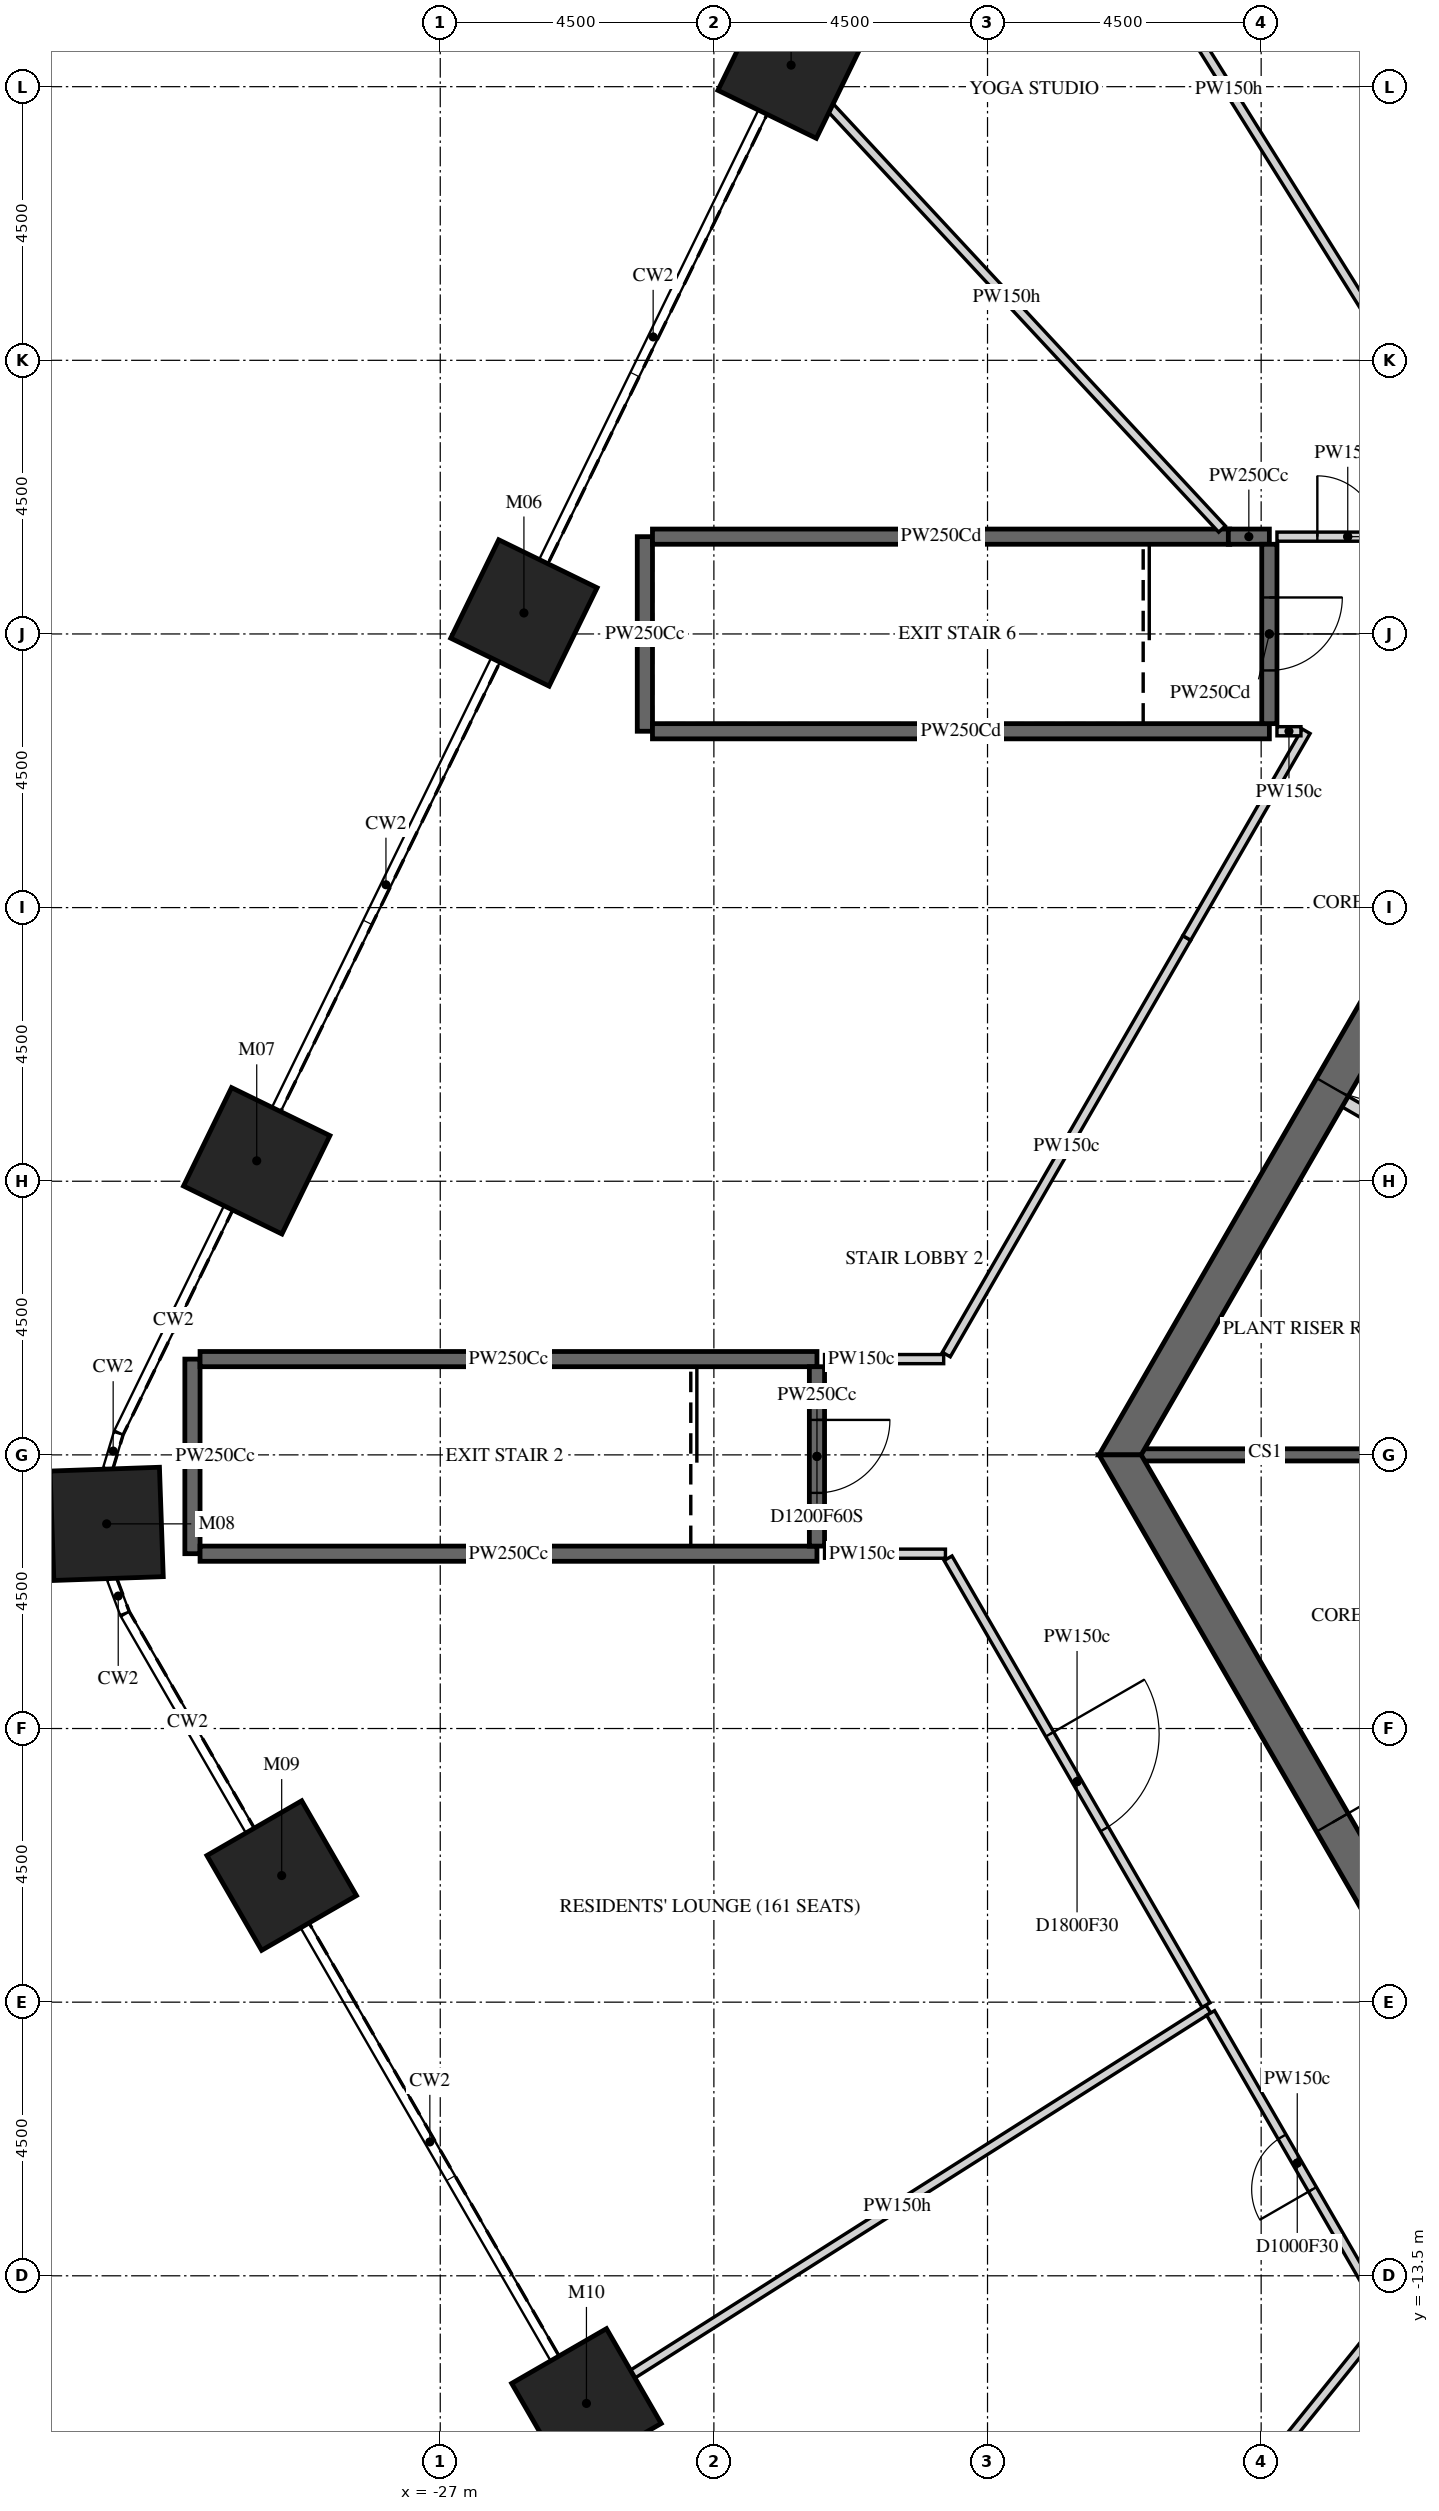
"""IFC4 building model, lengths in metres.
Left out: names, types, materials, properties, quantities, classifications, styles, units other than length and angle.
Written with IfcOpenShell. Run it as: python <this file> out.ifc"""

import sys

from ifc_helpers import new_model, si_unit, direction, frame, frame_2d, origin, origin_2d, place, context, subcontext, project, spatial, polyline, rectangle, outline, extrude, element, fill, save


model = new_model("IFC4")
c1 = context("Model", 3, precision=1e-05, world=origin(), true_north=direction((0.0, 1.0)))
c2 = subcontext(c1, "Body", "Model", "MODEL_VIEW")
j1 = project(units=[si_unit("LENGTHUNIT", "METRE"), si_unit("PLANEANGLEUNIT", "RADIAN")], contexts=[c1])
p1 = place(None, origin())
s1 = spatial("IfcSite", under=j1, at=p1, CompositionType="ELEMENT")
p2 = place(p1, origin())
s2 = spatial("IfcBuilding", under=s1, at=p2, CompositionType="ELEMENT")
p3 = place(p2, frame((0.0, 0.0, 26.0)))
s3 = spatial("IfcBuildingStorey", under=s2, at=p3, CompositionType="ELEMENT", Elevation=26.0)
for number, where, z_axis, x_axis in (
    (1, (-21.23, 22.854, -0.25), (0.0, 0.0, 1.0), (0.438, 0.899, 0.0)),
    (2, (-25.624, 13.845, -0.25), (0.0, 0.0, 1.0), (0.438, 0.899, 0.0)),
    (3, (-30.018, 4.836, -0.25), (0.0, 0.0, 1.0), (0.438, 0.899, 0.0)),
    (4, (-32.486, -1.135, -0.25), (0.0, 0.0, 1.0), (-0.035, 0.999, 0.0)),
    (5, (-29.608, -6.918, -0.25), (0.0, 0.0, 1.0), (-0.5, 0.866, 0.0)),
    (6, (-24.596, -15.599, -0.25), (0.0, 0.0, 1.0), (-0.5, 0.866, 0.0)),
):
    element("IfcColumn", number, at=place(p3, frame(where, z_axis=z_axis, x_axis=x_axis)), inside=s3, PredefinedType="COLUMN", context=c2, shape_type="SweptSolid", body=[
        extrude(rectangle(XDim=1.8, YDim=1.8, at=origin_2d()), origin(), (0.0, 0.0, 1.0), 5.45),
    ])
p4 = place(p3, frame((-7.91, 13.7, -0.25), z_axis=(0.0, 0.0, 1.0), x_axis=(-0.499999880136, -0.866025472988, 0.0)))
e7 = element("IfcWall", 7, at=p4, inside=s3, PredefinedType="SHEAR", context=c2, shape_type="SweptSolid", body=[
    extrude(outline(polyline([(-0.173, -0.3), (15.993, -0.3), (15.646, 0.3), (0.173, 0.3), (-0.173, -0.3)])), origin(), (0.0, 0.0, 1.0), 5.45),
])
p5 = place(p4, frame((7.039, 0.0, 0.25)))
e8 = element("IfcOpeningElement", 8, at=p5, cuts=e7, PredefinedType="OPENING", context=c2, shape_type="SweptSolid", body=[
    extrude(rectangle(XDim=1.8, YDim=2.4, at=frame_2d((0.9, 1.2))), frame((0.0, 0.31, 0.0), z_axis=(0.0, -1.0, 0.0), x_axis=(1.0, 0.0, 0.0)), (0.0, 0.0, 1.0), 0.62),
])
p6 = place(p3, frame((-15.819, 0.0, -0.25), z_axis=(0.0, 0.0, 1.0), x_axis=(0.499999880136, -0.866025472988, 0.0)))
e9 = element("IfcWall", 9, at=p6, inside=s3, PredefinedType="SHEAR", context=c2, shape_type="SweptSolid", body=[
    extrude(outline(polyline([(-0.173, -0.3), (15.993, -0.3), (15.646, 0.3), (0.173, 0.3), (-0.173, -0.3)])), origin(), (0.0, 0.0, 1.0), 5.45),
])
p7 = place(p6, frame((6.981, 0.0, 0.25)))
e10 = element("IfcOpeningElement", 10, at=p7, cuts=e9, PredefinedType="OPENING", context=c2, shape_type="SweptSolid", body=[
    extrude(rectangle(XDim=1.8, YDim=2.4, at=frame_2d((0.9, 1.2))), frame((0.0, 0.31, 0.0), z_axis=(0.0, -1.0, 0.0), x_axis=(1.0, 0.0, 0.0)), (0.0, 0.0, 1.0), 0.62),
])
p8 = place(p3, frame((-11.547, 0.0, -0.25), z_axis=(0.0, 0.0, 1.0), x_axis=(-1.0, 0.0, 0.0)))
e11 = element("IfcWall", 11, at=p8, inside=s3, PredefinedType="SHEAR", context=c2, shape_type="SweptSolid", body=[
    extrude(rectangle(XDim=3.926, YDim=0.2, at=frame_2d((1.963, 0.0))), origin(), (0.0, 0.0, 1.0), 5.45),
])
p9 = place(p3, frame((-9.175, 4.109, 0.0), z_axis=(0.0, 0.0, 1.0), x_axis=(-0.865989465428, 0.500062241894, 0.0)))
e12 = element("IfcWall", 12, at=p9, inside=s3, PredefinedType="PARTITIONING", context=c2, shape_type="SweptSolid", body=[
    extrude(rectangle(XDim=3.4, YDim=0.2, at=frame_2d((1.7, 0.0))), origin(), (0.0, 0.0, 1.0), 5.25),
])
p10 = place(p9, frame((1.351, 0.0, 0.0)))
e13 = element("IfcOpeningElement", 13, at=p10, cuts=e12, PredefinedType="OPENING", context=c2, shape_type="SweptSolid", body=[
    extrude(rectangle(XDim=0.9, YDim=2.1, at=frame_2d((0.45, 1.05))), frame((0.0, 0.11, 0.0), z_axis=(0.0, -1.0, 0.0), x_axis=(1.0, 0.0, 0.0)), (0.0, 0.0, 1.0), 0.22),
])
p11 = place(p3, frame((-31.075, -1.625, 0.0), z_axis=(0.0, 0.0, 1.0), x_axis=(0.0, 1.0, 0.0)))
e14 = element("IfcWall", 14, at=p11, inside=s3, PredefinedType="PARTITIONING", context=c2, shape_type="SweptSolid", body=[
    extrude(rectangle(XDim=3.2, YDim=0.25, at=frame_2d((1.6, 0.0))), origin(), (0.0, 0.0, 1.0), 5.2),
])
p12 = place(p3, frame((-30.95, 1.575, 0.0), z_axis=(0.0, 0.0, 1.0), x_axis=(1.0, 0.0, 0.0)))
e15 = element("IfcWall", 15, at=p12, inside=s3, PredefinedType="PARTITIONING", context=c2, shape_type="SweptSolid", body=[
    extrude(rectangle(XDim=10.145, YDim=0.25, at=frame_2d((5.073, 0.0))), origin(), (0.0, 0.0, 1.0), 5.2),
])
p13 = place(p3, frame((-24.596, -15.599, 0.0), z_axis=(0.0, 0.0, 1.0), x_axis=(0.844484782983, 0.535579547136, 0.0)))
e16 = element("IfcWall", 16, at=p13, inside=s3, PredefinedType="PARTITIONING", context=c2, shape_type="SweptSolid", body=[
    extrude(rectangle(XDim=12.11, YDim=0.15, at=frame_2d((6.055, 0.0))), origin(), (0.0, 0.0, 1.0), 4.273),
])
p14 = place(p3, frame((-23.635, 11.9, 0.0), z_axis=(0.0, 0.0, 1.0), x_axis=(0.0, 1.0, 0.0)))
e17 = element("IfcWall", 17, at=p14, inside=s3, PredefinedType="PARTITIONING", context=c2, shape_type="SweptSolid", body=[
    extrude(rectangle(XDim=3.2, YDim=0.25, at=frame_2d((1.6, 0.0))), origin(), (0.0, 0.0, 1.0), 5.2),
])
p15 = place(p3, frame((-23.51, 15.1, 0.0), z_axis=(0.0, 0.0, 1.0), x_axis=(1.0, 0.0, 0.0)))
e18 = element("IfcWall", 18, at=p15, inside=s3, PredefinedType="PARTITIONING", context=c2, shape_type="SweptSolid", body=[
    extrude(rectangle(XDim=9.493, YDim=0.25, at=frame_2d((4.747, 0.0))), origin(), (0.0, 0.0, 1.0), 4.273),
])
p16 = place(p3, frame((-21.23, 22.854, 0.0), z_axis=(0.0, 0.0, 1.0), x_axis=(0.680602169668, -0.732653183057, 0.0)))
e19 = element("IfcWall", 19, at=p16, inside=s3, PredefinedType="PARTITIONING", context=c2, shape_type="SweptSolid", body=[
    extrude(rectangle(XDim=10.413, YDim=0.15, at=frame_2d((5.206, 0.0))), origin(), (0.0, 0.0, 1.0), 4.273),
])
p17 = place(p3, frame((-20.805, -1.625, 0.0), z_axis=(0.0, 0.0, 1.0), x_axis=(-1.0, 0.0, 0.0)))
e20 = element("IfcWall", 20, at=p17, inside=s3, PredefinedType="PARTITIONING", context=c2, shape_type="SweptSolid", body=[
    extrude(rectangle(XDim=10.145, YDim=0.25, at=frame_2d((5.073, 0.0))), origin(), (0.0, 0.0, 1.0), 5.2),
])
p18 = place(p3, frame((-20.805, 1.45, 0.0), z_axis=(0.0, 0.0, 1.0), x_axis=(0.0, -1.0, 0.0)))
e21 = element("IfcWall", 21, at=p18, inside=s3, PredefinedType="PARTITIONING", context=c2, shape_type="SweptSolid", body=[
    extrude(rectangle(XDim=2.95, YDim=0.25, at=frame_2d((1.475, 0.0))), origin(), (0.0, 0.0, 1.0), 5.2),
])
p19 = place(p18, frame((0.875, 0.0, 0.0)))
e22 = element("IfcOpeningElement", 22, at=p19, cuts=e21, PredefinedType="OPENING", context=c2, shape_type="SweptSolid", body=[
    extrude(rectangle(XDim=1.2, YDim=2.1, at=frame_2d((0.6, 1.05))), frame((0.0, 0.135, 0.0), z_axis=(0.0, -1.0, 0.0), x_axis=(1.0, 0.0, 0.0)), (0.0, 0.0, 1.0), 0.27),
])
p20 = place(p3, frame((-20.68, 1.575, 0.0), z_axis=(0.0, 0.0, 1.0), x_axis=(1.0, 0.0, 0.0)))
e23 = element("IfcWall", 23, at=p20, inside=s3, PredefinedType="PARTITIONING", context=c2, shape_type="SweptSolid", body=[
    extrude(rectangle(XDim=1.959, YDim=0.15, at=frame_2d((0.979, 0.0))), origin(), (0.0, 0.0, 1.0), 5.2),
])
p21 = place(p3, frame((-19.584, -24.28, 0.0), z_axis=(0.0, 0.0, 1.0), x_axis=(0.627807267634, 0.77836882948, 0.0)))
e24 = element("IfcWall", 24, at=p21, inside=s3, PredefinedType="PARTITIONING", context=c2, shape_type="SweptSolid", body=[
    extrude(rectangle(XDim=12.971, YDim=0.15, at=frame_2d((6.485, 0.0))), origin(), (0.0, 0.0, 1.0), 5.2),
])
p22 = place(p3, frame((-18.692, -1.625, 0.0), z_axis=(0.0, 0.0, 1.0), x_axis=(-1.0, 0.0, 0.0)))
e25 = element("IfcWall", 25, at=p22, inside=s3, PredefinedType="PARTITIONING", context=c2, shape_type="SweptSolid", body=[
    extrude(rectangle(XDim=1.988, YDim=0.15, at=frame_2d((0.994, 0.0))), origin(), (0.0, 0.0, 1.0), 5.2),
])
p23 = place(p3, frame((-18.649, -1.7, 0.0), z_axis=(0.0, 0.0, 1.0), x_axis=(0.499976511579, -0.866038964406, 0.0)))
e26 = element("IfcWall", 26, at=p23, inside=s3, PredefinedType="PARTITIONING", context=c2, shape_type="SweptSolid", body=[
    extrude(rectangle(XDim=8.485, YDim=0.15, at=frame_2d((4.242, 0.0))), origin(), (0.0, 0.0, 1.0), 5.2),
])
p24 = place(p23, frame((3.342, 0.0, 0.0)))
e27 = element("IfcOpeningElement", 27, at=p24, cuts=e26, PredefinedType="OPENING", context=c2, shape_type="SweptSolid", body=[
    extrude(rectangle(XDim=1.8, YDim=2.1, at=frame_2d((0.9, 1.05))), frame((0.0, 0.085, 0.0), z_axis=(0.0, -1.0, 0.0), x_axis=(1.0, 0.0, 0.0)), (0.0, 0.0, 1.0), 0.17),
])
p25 = place(p3, frame((-17.861, 28.584, 0.0), z_axis=(0.0, 0.0, 1.0), x_axis=(0.529906308886, -0.848056191418, 0.0)))
e28 = element("IfcWall", 28, at=p25, inside=s3, PredefinedType="PARTITIONING", context=c2, shape_type="SweptSolid", body=[
    extrude(rectangle(XDim=14.452, YDim=0.15, at=frame_2d((7.226, 0.0))), origin(), (0.0, 0.0, 1.0), 4.273),
])
p26 = place(p3, frame((-14.723, 8.5, 0.0), z_axis=(0.0, 0.0, 1.0), x_axis=(-0.499993197506, -0.86602933117, 0.0)))
e29 = element("IfcWall", 29, at=p26, inside=s3, PredefinedType="PARTITIONING", context=c2, shape_type="SweptSolid", body=[
    extrude(rectangle(XDim=7.91, YDim=0.15, at=frame_2d((3.955, 0.0))), origin(), (0.0, 0.0, 1.0), 5.2),
])
p27 = place(p3, frame((-11.481, -14.114, 0.0), z_axis=(0.0, 0.0, 1.0), x_axis=(-0.500049947645, 0.865996564577, 0.0)))
e30 = element("IfcWall", 30, at=p27, inside=s3, PredefinedType="PARTITIONING", context=c2, shape_type="SweptSolid", body=[
    extrude(rectangle(XDim=5.7, YDim=0.15, at=frame_2d((2.85, 0.0))), origin(), (0.0, 0.0, 1.0), 5.2),
])
p28 = place(p27, frame((2.35, 0.0, 0.0)))
e31 = element("IfcOpeningElement", 31, at=p28, cuts=e30, PredefinedType="OPENING", context=c2, shape_type="SweptSolid", body=[
    extrude(rectangle(XDim=1.0, YDim=2.1, at=frame_2d((0.5, 1.05))), frame((0.0, 0.085, 0.0), z_axis=(0.0, -1.0, 0.0), x_axis=(1.0, 0.0, 0.0)), (0.0, 0.0, 1.0), 0.17),
])
p29 = place(p3, frame((-14.04, 15.1, 0.0), z_axis=(0.0, 0.0, 1.0), x_axis=(1.0, 0.0, 0.0)))
e32 = element("IfcWall", 32, at=p29, inside=s3, PredefinedType="PARTITIONING", context=c2, shape_type="SweptSolid", body=[
    extrude(rectangle(XDim=0.675, YDim=0.25, at=frame_2d((0.337, 0.0))), origin(), (0.0, 0.0, 1.0), 5.2),
])
p30 = place(p3, frame((-13.365, 11.9, 0.0), z_axis=(0.0, 0.0, 1.0), x_axis=(-1.0, 0.0, 0.0)))
e33 = element("IfcWall", 33, at=p30, inside=s3, PredefinedType="PARTITIONING", context=c2, shape_type="SweptSolid", body=[
    extrude(rectangle(XDim=10.145, YDim=0.25, at=frame_2d((5.073, 0.0))), origin(), (0.0, 0.0, 1.0), 4.273),
])
p31 = place(p3, frame((-13.365, 14.975, 0.0), z_axis=(0.0, 0.0, 1.0), x_axis=(0.0, -1.0, 0.0)))
e34 = element("IfcWall", 34, at=p31, inside=s3, PredefinedType="PARTITIONING", context=c2, shape_type="SweptSolid", body=[
    extrude(rectangle(XDim=2.95, YDim=0.25, at=frame_2d((1.475, 0.0))), origin(), (0.0, 0.0, 1.0), 4.273),
])
p32 = place(p31, frame((0.875, 0.0, 0.0)))
e35 = element("IfcOpeningElement", 35, at=p32, cuts=e34, PredefinedType="OPENING", context=c2, shape_type="SweptSolid", body=[
    extrude(rectangle(XDim=1.2, YDim=2.1, at=frame_2d((0.6, 1.05))), frame((0.0, 0.135, 0.0), z_axis=(0.0, -1.0, 0.0), x_axis=(1.0, 0.0, 0.0)), (0.0, 0.0, 1.0), 0.27),
])
p33 = place(p3, frame((-13.24, 15.1, 0.0), z_axis=(0.0, 0.0, 1.0), x_axis=(1.0, 0.0, 0.0)))
e36 = element("IfcWall", 36, at=p33, inside=s3, PredefinedType="PARTITIONING", context=c2, shape_type="SweptSolid", body=[
    extrude(rectangle(XDim=2.328, YDim=0.15, at=frame_2d((1.164, 0.0))), origin(), (0.0, 0.0, 1.0), 5.2),
])
p34 = place(p33, frame((0.664, 0.0, 0.0)))
e37 = element("IfcOpeningElement", 37, at=p34, cuts=e36, PredefinedType="OPENING", context=c2, shape_type="SweptSolid", body=[
    extrude(rectangle(XDim=1.0, YDim=2.1, at=frame_2d((0.5, 1.05))), frame((0.0, 0.085, 0.0), z_axis=(0.0, -1.0, 0.0), x_axis=(1.0, 0.0, 0.0)), (0.0, 0.0, 1.0), 0.17),
])
p35 = place(p3, frame((-12.76, 11.9, 0.0), z_axis=(0.0, 0.0, 1.0), x_axis=(-0.50009934258, -0.865968040721, 0.0)))
e38 = element("IfcWall", 38, at=p35, inside=s3, PredefinedType="PARTITIONING", context=c2, shape_type="SweptSolid", body=[
    extrude(rectangle(XDim=3.925, YDim=0.15, at=frame_2d((1.962, 0.0))), origin(), (0.0, 0.0, 1.0), 5.2),
])
p36 = place(p3, frame((-12.846, 11.9, 0.0), z_axis=(0.0, 0.0, 1.0), x_axis=(-1.0, 0.0, 0.0)))
e39 = element("IfcWall", 39, at=p36, inside=s3, PredefinedType="PARTITIONING", context=c2, shape_type="SweptSolid", body=[
    extrude(rectangle(XDim=0.394, YDim=0.15, at=frame_2d((0.197, 0.0))), origin(), (0.0, 0.0, 1.0), 5.2),
])
p37 = place(p5, origin())
e40 = element("IfcDoor", 40, at=p37, inside=s3, OperationType="DOUBLE_DOOR_SINGLE_SWING", PredefinedType="DOOR", context=c2, shape_type="SweptSolid", body=[
    extrude(rectangle(XDim=1.8, YDim=2.4, at=frame_2d((0.9, 1.2))), frame((0.0, 0.025, 0.0), z_axis=(0.0, -1.0, 0.0), x_axis=(1.0, 0.0, 0.0)), (0.0, 0.0, 1.0), 0.05),
])
fill(e8, e40)
p38 = place(p7, origin())
e41 = element("IfcDoor", 41, at=p38, inside=s3, OperationType="DOUBLE_DOOR_SINGLE_SWING", PredefinedType="DOOR", context=c2, shape_type="SweptSolid", body=[
    extrude(rectangle(XDim=1.8, YDim=2.4, at=frame_2d((0.9, 1.2))), frame((0.0, 0.025, 0.0), z_axis=(0.0, -1.0, 0.0), x_axis=(1.0, 0.0, 0.0)), (0.0, 0.0, 1.0), 0.05),
])
fill(e10, e41)
p39 = place(p19, origin())
e42 = element("IfcDoor", 42, at=p39, inside=s3, OperationType="SINGLE_SWING_RIGHT", PredefinedType="DOOR", context=c2, shape_type="SweptSolid", body=[
    extrude(rectangle(XDim=1.2, YDim=2.1, at=frame_2d((0.6, 1.05))), frame((0.0, 0.025, 0.0), z_axis=(0.0, -1.0, 0.0), x_axis=(1.0, 0.0, 0.0)), (0.0, 0.0, 1.0), 0.05),
])
fill(e22, e42)
p40 = place(p24, origin())
e43 = element("IfcDoor", 43, at=p40, inside=s3, OperationType="DOUBLE_DOOR_SINGLE_SWING", PredefinedType="DOOR", context=c2, shape_type="SweptSolid", body=[
    extrude(rectangle(XDim=1.8, YDim=2.1, at=frame_2d((0.9, 1.05))), frame((0.0, 0.025, 0.0), z_axis=(0.0, -1.0, 0.0), x_axis=(1.0, 0.0, 0.0)), (0.0, 0.0, 1.0), 0.05),
])
fill(e27, e43)
p41 = place(p28, origin())
e44 = element("IfcDoor", 44, at=p41, inside=s3, OperationType="SINGLE_SWING_RIGHT", PredefinedType="DOOR", context=c2, shape_type="SweptSolid", body=[
    extrude(rectangle(XDim=1.0, YDim=2.1, at=frame_2d((0.5, 1.05))), frame((0.0, 0.025, 0.0), z_axis=(0.0, -1.0, 0.0), x_axis=(1.0, 0.0, 0.0)), (0.0, 0.0, 1.0), 0.05),
])
fill(e31, e44)
p42 = place(p32, origin())
e45 = element("IfcDoor", 45, at=p42, inside=s3, OperationType="SINGLE_SWING_LEFT", PredefinedType="DOOR", context=c2, shape_type="SweptSolid", body=[
    extrude(rectangle(XDim=1.2, YDim=2.1, at=frame_2d((0.6, 1.05))), frame((0.0, 0.025, 0.0), z_axis=(0.0, -1.0, 0.0), x_axis=(1.0, 0.0, 0.0)), (0.0, 0.0, 1.0), 0.05),
])
fill(e35, e45)
p43 = place(p34, origin())
e46 = element("IfcDoor", 46, at=p43, inside=s3, OperationType="SINGLE_SWING_RIGHT", PredefinedType="DOOR", context=c2, shape_type="SweptSolid", body=[
    extrude(rectangle(XDim=1.0, YDim=2.1, at=frame_2d((0.5, 1.05))), frame((0.0, 0.025, 0.0), z_axis=(0.0, -1.0, 0.0), x_axis=(1.0, 0.0, 0.0)), (0.0, 0.0, 1.0), 0.05),
])
fill(e37, e46)
save(model, sys.argv[1])
